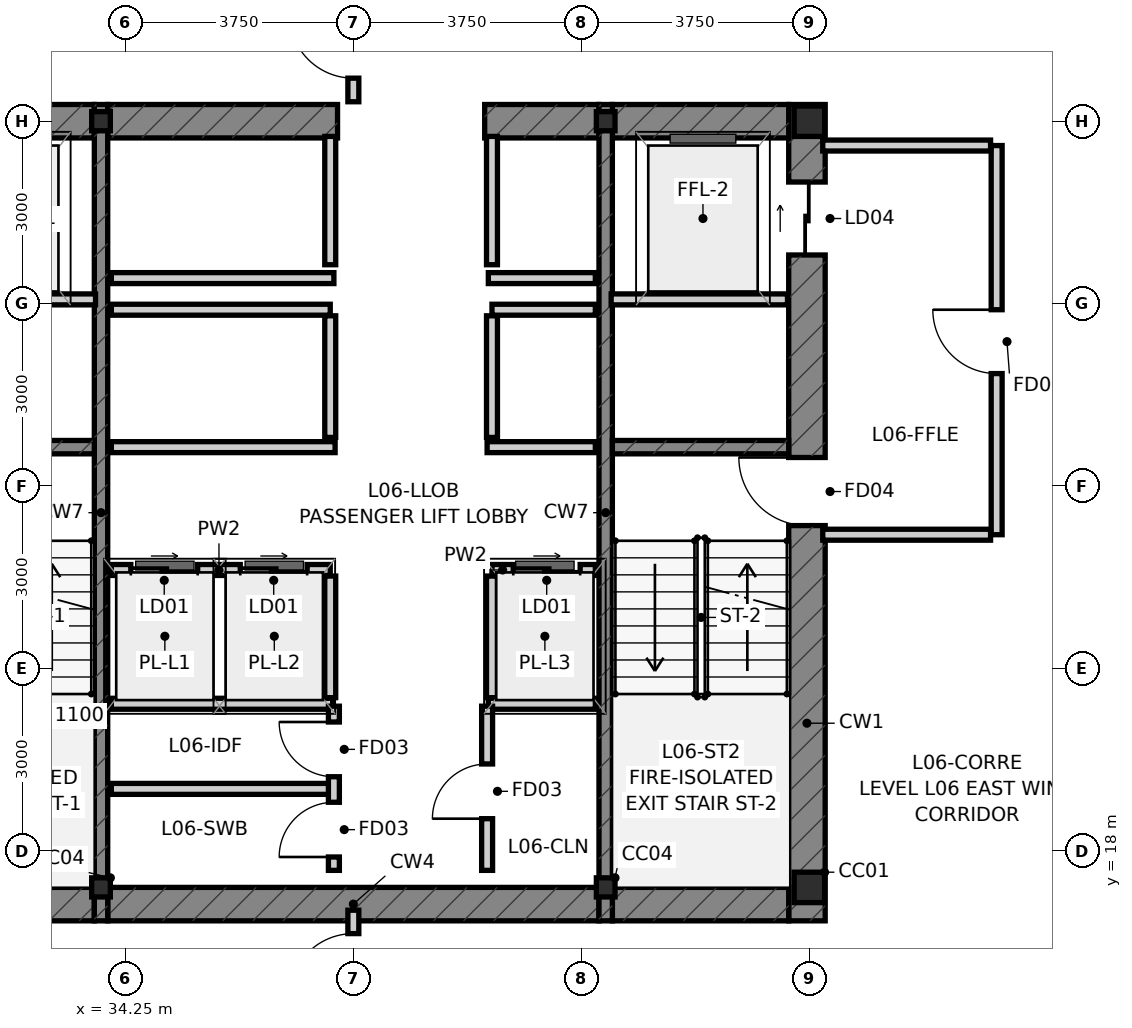
"""IFC4 building model, lengths in metres.
Left out: names, types, materials, properties, quantities, classifications, styles, units other than length and angle.
Written with IfcOpenShell. Run it as: python <this file> out.ifc"""

import sys

from ifc_helpers import new_model, si_unit, direction, frame, frame_2d, origin, origin_2d, place, context, subcontext, project, spatial, rectangle, i_section, extrude, source, transform, mapped, element, fill, save


model = new_model("IFC4")
c1 = context("Model", 3, precision=1e-05, world=origin(), true_north=direction((0.0, 1.0)))
c2 = subcontext(c1, "Body", "Model", "MODEL_VIEW")
j1 = project(units=[si_unit("LENGTHUNIT", "METRE"), si_unit("PLANEANGLEUNIT", "RADIAN")], contexts=[c1])
p1 = place(None, origin())
s1 = spatial("IfcSite", under=j1, at=p1, CompositionType="ELEMENT")
p2 = place(p1, origin())
s2 = spatial("IfcBuilding", under=s1, at=p2, CompositionType="ELEMENT")
p3 = place(p2, frame((0.0, 0.0, 27.6)))
s3 = spatial("IfcBuildingStorey", under=s2, at=p3, CompositionType="ELEMENT", Elevation=27.6)
m1 = source(origin(), c2, "Body", "SweptSolid", [
    extrude(i_section(OverallWidth=0.5, OverallDepth=0.5, WebThickness=0.028, FlangeThickness=0.04, at=origin_2d()), origin(), (0.0, 0.0, 1.0), 3.65),
])
for number, where, z_axis, x_axis in (
    (1, (45.5, 17.4, 0.0), (0.0, 0.0, 1.0), (1.0, 0.0, 0.0)),
    (2, (45.5, 30.0, 0.0), (0.0, 0.0, 1.0), (1.0, 0.0, 0.0)),
):
    element("IfcColumn", number, at=place(p3, frame(where, z_axis=z_axis, x_axis=x_axis)), inside=s3, PredefinedType="COLUMN", context=c2, shape_type="MappedRepresentation", body=[
        mapped(m1, transform((0.0, 0.0, 0.0), scale=1.0)),
    ])
m2 = source(origin(), c2, "Body", "SweptSolid", [
    extrude(i_section(OverallWidth=0.307, OverallDepth=0.315, WebThickness=0.012, FlangeThickness=0.019, at=origin_2d()), origin(), (0.0, 0.0, 1.0), 3.65),
])
for number, where, z_axis, x_axis in (
    (3, (33.85, 17.4, 0.0), (0.0, 0.0, 1.0), (1.0, 0.0, 0.0)),
    (4, (42.15, 17.4, 0.0), (0.0, 0.0, 1.0), (1.0, 0.0, 0.0)),
    (5, (33.85, 30.0, 0.0), (0.0, 0.0, 1.0), (1.0, 0.0, 0.0)),
    (6, (42.15, 30.0, 0.0), (0.0, 0.0, 1.0), (1.0, 0.0, 0.0)),
):
    element("IfcColumn", number, at=place(p3, frame(where, z_axis=z_axis, x_axis=x_axis)), inside=s3, PredefinedType="COLUMN", context=c2, shape_type="MappedRepresentation", body=[
        mapped(m2, transform((0.0, 0.0, 0.0), scale=1.0)),
    ])
p4 = place(p3, frame((45.46, 16.85, 0.0), z_axis=(0.0, 0.0, 1.0), x_axis=(0.0, 1.0, 0.0)))
e7 = element("IfcWall", 7, at=p4, inside=s3, PredefinedType="SHEAR", context=c2, shape_type="SweptSolid", body=[
    extrude(rectangle(XDim=13.425, YDim=0.6, at=frame_2d((6.712, 0.0))), origin(), (0.0, 0.0, 1.0), 3.65),
])
p5 = place(p4, frame((6.5, 0.0, 0.0)))
e8 = element("IfcOpeningElement", 8, at=p5, cuts=e7, PredefinedType="OPENING", context=c2, shape_type="SweptSolid", body=[
    extrude(rectangle(XDim=1.12, YDim=2.15, at=frame_2d((0.56, 1.075))), frame((0.0, 0.312, 0.0), z_axis=(0.0, -1.0, 0.0), x_axis=(1.0, 0.0, 0.0)), (0.0, 0.0, 1.0), 0.624),
])
p6 = place(p4, frame((10.95, 0.0, 0.0)))
e9 = element("IfcOpeningElement", 9, at=p6, cuts=e7, PredefinedType="OPENING", context=c2, shape_type="SweptSolid", body=[
    extrude(rectangle(XDim=1.2, YDim=2.2, at=frame_2d((0.6, 1.1))), frame((0.0, 0.312, 0.0), z_axis=(0.0, -1.0, 0.0), x_axis=(1.0, 0.0, 0.0)), (0.0, 0.0, 1.0), 0.624),
])
p7 = place(p3, frame((30.84, 17.125, 0.0), z_axis=(0.0, 0.0, 1.0), x_axis=(1.0, 0.0, 0.0)))
e10 = element("IfcWall", 10, at=p7, inside=s3, PredefinedType="SHEAR", context=c2, shape_type="SweptSolid", body=[
    extrude(rectangle(XDim=2.9, YDim=0.55, at=frame_2d((1.45, 0.0))), origin(), (0.0, 0.0, 1.0), 3.65),
])
p8 = place(p3, frame((33.96, 17.125, 0.0), z_axis=(0.0, 0.0, 1.0), x_axis=(1.0, 0.0, 0.0)))
e11 = element("IfcWall", 11, at=p8, inside=s3, PredefinedType="SHEAR", context=c2, shape_type="SweptSolid", body=[
    extrude(rectangle(XDim=8.08, YDim=0.55, at=frame_2d((4.04, 0.0))), origin(), (0.0, 0.0, 1.0), 3.65),
])
for number, where, z_axis, x_axis in (
    (12, (42.26, 17.125, 0.0), (0.0, 0.0, 1.0), (1.0, 0.0, 0.0)),
    (13, (30.84, 30.0, 0.0), (0.0, 0.0, 1.0), (1.0, 0.0, 0.0)),
):
    element("IfcWall", number, at=place(p3, frame(where, z_axis=z_axis, x_axis=x_axis)), inside=s3, PredefinedType="SHEAR", context=c2, shape_type="SweptSolid", body=[
        extrude(rectangle(XDim=2.9, YDim=0.55, at=frame_2d((1.45, 0.0))), origin(), (0.0, 0.0, 1.0), 3.65),
    ])
p9 = place(p3, frame((33.96, 30.0, 0.0), z_axis=(0.0, 0.0, 1.0), x_axis=(1.0, 0.0, 0.0)))
e14 = element("IfcWall", 14, at=p9, inside=s3, PredefinedType="SHEAR", context=c2, shape_type="SweptSolid", body=[
    extrude(rectangle(XDim=3.78, YDim=0.55, at=frame_2d((1.89, 0.0))), origin(), (0.0, 0.0, 1.0), 3.65),
])
p10 = place(p3, frame((40.16, 30.0, 0.0), z_axis=(0.0, 0.0, 1.0), x_axis=(1.0, 0.0, 0.0)))
e15 = element("IfcWall", 15, at=p10, inside=s3, PredefinedType="SHEAR", context=c2, shape_type="SweptSolid", body=[
    extrude(rectangle(XDim=1.88, YDim=0.55, at=frame_2d((0.94, 0.0))), origin(), (0.0, 0.0, 1.0), 3.65),
])
p11 = place(p3, frame((42.26, 30.0, 0.0), z_axis=(0.0, 0.0, 1.0), x_axis=(1.0, 0.0, 0.0)))
e16 = element("IfcWall", 16, at=p11, inside=s3, PredefinedType="SHEAR", context=c2, shape_type="SweptSolid", body=[
    extrude(rectangle(XDim=2.9, YDim=0.55, at=frame_2d((1.45, 0.0))), origin(), (0.0, 0.0, 1.0), 3.65),
])
for number, where, z_axis, x_axis in (
    (17, (33.85, 16.85, 0.0), (0.0, 0.0, 1.0), (0.0, 1.0, 0.0)),
    (18, (42.15, 16.85, 0.0), (0.0, 0.0, 1.0), (0.0, 1.0, 0.0)),
):
    element("IfcWall", number, at=place(p3, frame(where, z_axis=z_axis, x_axis=x_axis)), inside=s3, PredefinedType="SHEAR", context=c2, shape_type="SweptSolid", body=[
        extrude(rectangle(XDim=13.425, YDim=0.22, at=frame_2d((6.712, 0.0))), origin(), (0.0, 0.0, 1.0), 3.65),
    ])
for number, where, z_axis, x_axis in (
    (19, (30.84, 24.64, 0.0), (0.0, 0.0, 1.0), (1.0, 0.0, 0.0)),
    (20, (42.26, 24.64, 0.0), (0.0, 0.0, 1.0), (1.0, 0.0, 0.0)),
):
    element("IfcWall", number, at=place(p3, frame(where, z_axis=z_axis, x_axis=x_axis)), inside=s3, PredefinedType="SHEAR", context=c2, shape_type="SweptSolid", body=[
        extrude(rectangle(XDim=2.9, YDim=0.22, at=frame_2d((1.45, 0.0))), origin(), (0.0, 0.0, 1.0), 3.65),
    ])
p12 = place(p3, frame((34.02, 22.62, 0.0), z_axis=(0.0, 0.0, 1.0), x_axis=(1.0, 0.0, 0.0)))
e21 = element("IfcWall", 21, at=p12, inside=s3, PredefinedType="PARTITIONING", context=c2, shape_type="SweptSolid", body=[
    extrude(rectangle(XDim=3.6, YDim=0.18, at=frame_2d((1.8, 0.0))), origin(), (0.0, 0.0, 1.0), 3.4),
])
p13 = place(p12, frame((0.32, 0.0, 0.0)))
e22 = element("IfcOpeningElement", 22, at=p13, cuts=e21, PredefinedType="OPENING", context=c2, shape_type="SweptSolid", body=[
    extrude(rectangle(XDim=1.1, YDim=2.2, at=frame_2d((0.55, 1.1))), frame((0.0, 0.102, 0.0), z_axis=(0.0, -1.0, 0.0), x_axis=(1.0, 0.0, 0.0)), (0.0, 0.0, 1.0), 0.204),
])
p14 = place(p12, frame((2.12, 0.0, 0.0)))
e23 = element("IfcOpeningElement", 23, at=p14, cuts=e21, PredefinedType="OPENING", context=c2, shape_type="SweptSolid", body=[
    extrude(rectangle(XDim=1.1, YDim=2.2, at=frame_2d((0.55, 1.1))), frame((0.0, 0.102, 0.0), z_axis=(0.0, -1.0, 0.0), x_axis=(1.0, 0.0, 0.0)), (0.0, 0.0, 1.0), 0.204),
])
p15 = place(p3, frame((40.28, 22.62, 0.0), z_axis=(0.0, 0.0, 1.0), x_axis=(1.0, 0.0, 0.0)))
e24 = element("IfcWall", 24, at=p15, inside=s3, PredefinedType="PARTITIONING", context=c2, shape_type="SweptSolid", body=[
    extrude(rectangle(XDim=1.7, YDim=0.18, at=frame_2d((0.85, 0.0))), origin(), (0.0, 0.0, 1.0), 3.4),
])
p16 = place(p15, frame((0.35, 0.0, 0.0)))
e25 = element("IfcOpeningElement", 25, at=p16, cuts=e24, PredefinedType="OPENING", context=c2, shape_type="SweptSolid", body=[
    extrude(rectangle(XDim=1.1, YDim=2.2, at=frame_2d((0.55, 1.1))), frame((0.0, 0.102, 0.0), z_axis=(0.0, -1.0, 0.0), x_axis=(1.0, 0.0, 0.0)), (0.0, 0.0, 1.0), 0.204),
])
for number, where, z_axis, x_axis in (
    (26, (37.62, 20.52, 0.0), (0.0, 0.0, 1.0), (0.0, 1.0, 0.0)),
    (27, (40.28, 20.52, 0.0), (0.0, 0.0, 1.0), (0.0, 1.0, 0.0)),
):
    element("IfcWall", number, at=place(p3, frame(where, z_axis=z_axis, x_axis=x_axis)), inside=s3, PredefinedType="PARTITIONING", context=c2, shape_type="SweptSolid", body=[
        extrude(rectangle(XDim=2.0, YDim=0.18, at=frame_2d((1.0, 0.0))), origin(), (0.0, 0.0, 1.0), 3.4),
    ])
p17 = place(p3, frame((34.02, 26.9, 0.0), z_axis=(0.0, 0.0, 1.0), x_axis=(1.0, 0.0, 0.0)))
e28 = element("IfcWall", 28, at=p17, inside=s3, PredefinedType="PARTITIONING", context=c2, shape_type="SweptSolid", body=[
    extrude(rectangle(XDim=3.6, YDim=0.18, at=frame_2d((1.8, 0.0))), origin(), (0.0, 0.0, 1.0), 3.4),
])
p18 = place(p3, frame((40.28, 26.9, 0.0), z_axis=(0.0, 0.0, 1.0), x_axis=(1.0, 0.0, 0.0)))
e29 = element("IfcWall", 29, at=p18, inside=s3, PredefinedType="PARTITIONING", context=c2, shape_type="SweptSolid", body=[
    extrude(rectangle(XDim=1.7, YDim=0.18, at=frame_2d((0.85, 0.0))), origin(), (0.0, 0.0, 1.0), 3.4),
])
for number, where, z_axis, x_axis in (
    (30, (37.62, 24.8, 0.0), (0.0, 0.0, 1.0), (0.0, 1.0, 0.0)),
    (31, (40.28, 24.8, 0.0), (0.0, 0.0, 1.0), (0.0, 1.0, 0.0)),
):
    element("IfcWall", number, at=place(p3, frame(where, z_axis=z_axis, x_axis=x_axis)), inside=s3, PredefinedType="PARTITIONING", context=c2, shape_type="SweptSolid", body=[
        extrude(rectangle(XDim=2.0, YDim=0.18, at=frame_2d((1.0, 0.0))), origin(), (0.0, 0.0, 1.0), 3.4),
    ])
p19 = place(p3, frame((34.02, 24.64, 0.0), z_axis=(0.0, 0.0, 1.0), x_axis=(1.0, 0.0, 0.0)))
e32 = element("IfcWall", 32, at=p19, inside=s3, PredefinedType="PARTITIONING", context=c2, shape_type="SweptSolid", body=[
    extrude(rectangle(XDim=3.68, YDim=0.18, at=frame_2d((1.84, 0.0))), origin(), (0.0, 0.0, 1.0), 3.4),
])
p20 = place(p3, frame((40.2, 24.64, 0.0), z_axis=(0.0, 0.0, 1.0), x_axis=(1.0, 0.0, 0.0)))
e33 = element("IfcWall", 33, at=p20, inside=s3, PredefinedType="PARTITIONING", context=c2, shape_type="SweptSolid", body=[
    extrude(rectangle(XDim=1.78, YDim=0.18, at=frame_2d((0.89, 0.0))), origin(), (0.0, 0.0, 1.0), 3.4),
])
p21 = place(p3, frame((34.02, 27.42, 0.0), z_axis=(0.0, 0.0, 1.0), x_axis=(1.0, 0.0, 0.0)))
e34 = element("IfcWall", 34, at=p21, inside=s3, PredefinedType="PARTITIONING", context=c2, shape_type="SweptSolid", body=[
    extrude(rectangle(XDim=3.66, YDim=0.18, at=frame_2d((1.83, 0.0))), origin(), (0.0, 0.0, 1.0), 3.4),
])
p22 = place(p3, frame((40.22, 27.42, 0.0), z_axis=(0.0, 0.0, 1.0), x_axis=(1.0, 0.0, 0.0)))
e35 = element("IfcWall", 35, at=p22, inside=s3, PredefinedType="PARTITIONING", context=c2, shape_type="SweptSolid", body=[
    extrude(rectangle(XDim=1.76, YDim=0.18, at=frame_2d((0.88, 0.0))), origin(), (0.0, 0.0, 1.0), 3.4),
])
for number, where, z_axis, x_axis in (
    (36, (37.62, 27.64, 0.0), (0.0, 0.0, 1.0), (0.0, 1.0, 0.0)),
    (37, (40.28, 27.64, 0.0), (0.0, 0.0, 1.0), (0.0, 1.0, 0.0)),
):
    element("IfcWall", number, at=place(p3, frame(where, z_axis=z_axis, x_axis=x_axis)), inside=s3, PredefinedType="PARTITIONING", context=c2, shape_type="SweptSolid", body=[
        extrude(rectangle(XDim=2.11, YDim=0.18, at=frame_2d((1.055, 0.0))), origin(), (0.0, 0.0, 1.0), 3.4),
    ])
p23 = place(p3, frame((48.58, 23.2, 0.0), z_axis=(0.0, 0.0, 1.0), x_axis=(0.0, 1.0, 0.0)))
e38 = element("IfcWall", 38, at=p23, inside=s3, PredefinedType="PARTITIONING", context=c2, shape_type="SweptSolid", body=[
    extrude(rectangle(XDim=6.4, YDim=0.18, at=frame_2d((3.2, 0.0))), origin(), (0.0, 0.0, 1.0), 3.4),
])
p24 = place(p23, frame((2.65, 0.0, 0.0)))
e39 = element("IfcOpeningElement", 39, at=p24, cuts=e38, PredefinedType="OPENING", context=c2, shape_type="SweptSolid", body=[
    extrude(rectangle(XDim=1.05, YDim=2.15, at=frame_2d((0.525, 1.075))), frame((0.0, 0.102, 0.0), z_axis=(0.0, -1.0, 0.0), x_axis=(1.0, 0.0, 0.0)), (0.0, 0.0, 1.0), 0.204),
])
p25 = place(p3, frame((45.72, 23.2, 0.0), z_axis=(0.0, 0.0, 1.0), x_axis=(1.0, 0.0, 0.0)))
e40 = element("IfcWall", 40, at=p25, inside=s3, PredefinedType="PARTITIONING", context=c2, shape_type="SweptSolid", body=[
    extrude(rectangle(XDim=2.76, YDim=0.18, at=frame_2d((1.38, 0.0))), origin(), (0.0, 0.0, 1.0), 3.4),
])
p26 = place(p3, frame((45.72, 29.6, 0.0), z_axis=(0.0, 0.0, 1.0), x_axis=(1.0, 0.0, 0.0)))
e41 = element("IfcWall", 41, at=p26, inside=s3, PredefinedType="PARTITIONING", context=c2, shape_type="SweptSolid", body=[
    extrude(rectangle(XDim=2.76, YDim=0.18, at=frame_2d((1.38, 0.0))), origin(), (0.0, 0.0, 1.0), 2.783),
])
for number, where, z_axis, x_axis in (
    (42, (30.86, 27.07, 0.0), (0.0, 0.0, 1.0), (1.0, 0.0, 0.0)),
    (43, (42.24, 27.07, 0.0), (0.0, 0.0, 1.0), (1.0, 0.0, 0.0)),
):
    element("IfcWall", number, at=place(p3, frame(where, z_axis=z_axis, x_axis=x_axis)), inside=s3, PredefinedType="PARTITIONING", context=c2, shape_type="SweptSolid", body=[
        extrude(rectangle(XDim=2.9, YDim=0.18, at=frame_2d((1.45, 0.0))), origin(), (0.0, 0.0, 1.0), 3.4),
    ])
p27 = place(p3, frame((34.02, 20.42, 0.0), z_axis=(0.0, 0.0, 1.0), x_axis=(1.0, 0.0, 0.0)))
e44 = element("IfcWall", 44, at=p27, inside=s3, PredefinedType="PARTITIONING", context=c2, shape_type="SweptSolid", body=[
    extrude(rectangle(XDim=3.64, YDim=0.18, at=frame_2d((1.82, 0.0))), origin(), (0.0, 0.0, 1.0), 3.4),
])
p28 = place(p3, frame((40.22, 20.42, 0.0), z_axis=(0.0, 0.0, 1.0), x_axis=(1.0, 0.0, 0.0)))
e45 = element("IfcWall", 45, at=p28, inside=s3, PredefinedType="PARTITIONING", context=c2, shape_type="SweptSolid", body=[
    extrude(rectangle(XDim=1.76, YDim=0.18, at=frame_2d((0.88, 0.0))), origin(), (0.0, 0.0, 1.0), 3.4),
])
p29 = place(p3, frame((34.02, 19.02, 0.0), z_axis=(0.0, 0.0, 1.0), x_axis=(1.0, 0.0, 0.0)))
e46 = element("IfcWall", 46, at=p29, inside=s3, PredefinedType="PARTITIONING", context=c2, shape_type="SweptSolid", body=[
    extrude(rectangle(XDim=3.58, YDim=0.18, at=frame_2d((1.79, 0.0))), origin(), (0.0, 0.0, 1.0), 3.4),
])
p30 = place(p3, frame((37.68, 17.68, 0.0), z_axis=(0.0, 0.0, 1.0), x_axis=(0.0, 1.0, 0.0)))
e47 = element("IfcWall", 47, at=p30, inside=s3, PredefinedType="PARTITIONING", context=c2, shape_type="SweptSolid", body=[
    extrude(rectangle(XDim=2.7, YDim=0.18, at=frame_2d((1.35, 0.0))), origin(), (0.0, 0.0, 1.0), 3.4),
])
p31 = place(p30, frame((0.22, 0.0, 0.0)))
e48 = element("IfcOpeningElement", 48, at=p31, cuts=e47, PredefinedType="OPENING", context=c2, shape_type="SweptSolid", body=[
    extrude(rectangle(XDim=0.9, YDim=2.1, at=frame_2d((0.45, 1.05))), frame((0.0, 0.102, 0.0), z_axis=(0.0, -1.0, 0.0), x_axis=(1.0, 0.0, 0.0)), (0.0, 0.0, 1.0), 0.204),
])
p32 = place(p30, frame((1.54, 0.0, 0.0)))
e49 = element("IfcOpeningElement", 49, at=p32, cuts=e47, PredefinedType="OPENING", context=c2, shape_type="SweptSolid", body=[
    extrude(rectangle(XDim=0.9, YDim=2.1, at=frame_2d((0.45, 1.05))), frame((0.0, 0.102, 0.0), z_axis=(0.0, -1.0, 0.0), x_axis=(1.0, 0.0, 0.0)), (0.0, 0.0, 1.0), 0.204),
])
p33 = place(p3, frame((40.2, 17.68, 0.0), z_axis=(0.0, 0.0, 1.0), x_axis=(0.0, 1.0, 0.0)))
e50 = element("IfcWall", 50, at=p33, inside=s3, PredefinedType="PARTITIONING", context=c2, shape_type="SweptSolid", body=[
    extrude(rectangle(XDim=2.7, YDim=0.18, at=frame_2d((1.35, 0.0))), origin(), (0.0, 0.0, 1.0), 3.4),
])
p34 = place(p33, frame((0.85, 0.0, 0.0)))
e51 = element("IfcOpeningElement", 51, at=p34, cuts=e50, PredefinedType="OPENING", context=c2, shape_type="SweptSolid", body=[
    extrude(rectangle(XDim=0.9, YDim=2.1, at=frame_2d((0.45, 1.05))), frame((0.0, 0.102, 0.0), z_axis=(0.0, -1.0, 0.0), x_axis=(1.0, 0.0, 0.0)), (0.0, 0.0, 1.0), 0.204),
])
p35 = place(p3, frame((38.0, 15.205, 0.0), z_axis=(0.0, 0.0, 1.0), x_axis=(0.0, 1.0, 0.0)))
e52 = element("IfcWall", 52, at=p35, inside=s3, PredefinedType="PARTITIONING", context=c2, shape_type="SweptSolid", body=[
    extrude(rectangle(XDim=1.82, YDim=0.18, at=frame_2d((0.91, 0.0))), origin(), (0.0, 0.0, 1.0), 3.4),
])
p36 = place(p35, frame((0.385, 0.0, 0.0)))
e53 = element("IfcOpeningElement", 53, at=p36, cuts=e52, PredefinedType="OPENING", context=c2, shape_type="SweptSolid", body=[
    extrude(rectangle(XDim=1.05, YDim=2.15, at=frame_2d((0.525, 1.075))), frame((0.0, 0.102, 0.0), z_axis=(0.0, -1.0, 0.0), x_axis=(1.0, 0.0, 0.0)), (0.0, 0.0, 1.0), 0.204),
])
p37 = place(p3, frame((38.0, 30.32, 0.0), z_axis=(0.0, 0.0, 1.0), x_axis=(0.0, 1.0, 0.0)))
e54 = element("IfcWall", 54, at=p37, inside=s3, PredefinedType="PARTITIONING", context=c2, shape_type="SweptSolid", body=[
    extrude(rectangle(XDim=1.825, YDim=0.18, at=frame_2d((0.913, 0.0))), origin(), (0.0, 0.0, 1.0), 3.4),
])
p38 = place(p37, frame((0.388, 0.0, 0.0)))
e55 = element("IfcOpeningElement", 55, at=p38, cuts=e54, PredefinedType="OPENING", context=c2, shape_type="SweptSolid", body=[
    extrude(rectangle(XDim=1.05, YDim=2.15, at=frame_2d((0.525, 1.075))), frame((0.0, 0.102, 0.0), z_axis=(0.0, -1.0, 0.0), x_axis=(1.0, 0.0, 0.0)), (0.0, 0.0, 1.0), 0.204),
])
p39 = place(p5, origin())
e56 = element("IfcDoor", 56, at=p39, inside=s3, OperationType="SINGLE_SWING_RIGHT", PredefinedType="DOOR", context=c2, shape_type="SweptSolid", body=[
    extrude(rectangle(XDim=1.12, YDim=2.15, at=frame_2d((0.56, 1.075))), frame((0.0, 0.025, 0.0), z_axis=(0.0, -1.0, 0.0), x_axis=(1.0, 0.0, 0.0)), (0.0, 0.0, 1.0), 0.05),
])
fill(e8, e56)
p40 = place(p6, origin())
e57 = element("IfcDoor", 57, at=p40, inside=s3, OperationType="SLIDING_TO_RIGHT", PredefinedType="DOOR", context=c2, shape_type="SweptSolid", body=[
    extrude(rectangle(XDim=1.2, YDim=2.2, at=frame_2d((0.6, 1.1))), frame((0.0, 0.025, 0.0), z_axis=(0.0, -1.0, 0.0), x_axis=(1.0, 0.0, 0.0)), (0.0, 0.0, 1.0), 0.05),
])
fill(e9, e57)
p41 = place(p13, origin())
e58 = element("IfcDoor", 58, at=p41, inside=s3, OperationType="SLIDING_TO_LEFT", PredefinedType="DOOR", context=c2, shape_type="SweptSolid", body=[
    extrude(rectangle(XDim=1.1, YDim=2.2, at=frame_2d((0.55, 1.1))), frame((0.0, 0.025, 0.0), z_axis=(0.0, -1.0, 0.0), x_axis=(1.0, 0.0, 0.0)), (0.0, 0.0, 1.0), 0.05),
])
fill(e22, e58)
p42 = place(p14, origin())
e59 = element("IfcDoor", 59, at=p42, inside=s3, OperationType="SLIDING_TO_RIGHT", PredefinedType="DOOR", context=c2, shape_type="SweptSolid", body=[
    extrude(rectangle(XDim=1.1, YDim=2.2, at=frame_2d((0.55, 1.1))), frame((0.0, 0.025, 0.0), z_axis=(0.0, -1.0, 0.0), x_axis=(1.0, 0.0, 0.0)), (0.0, 0.0, 1.0), 0.05),
])
fill(e23, e59)
p43 = place(p16, origin())
e60 = element("IfcDoor", 60, at=p43, inside=s3, OperationType="SLIDING_TO_LEFT", PredefinedType="DOOR", context=c2, shape_type="SweptSolid", body=[
    extrude(rectangle(XDim=1.1, YDim=2.2, at=frame_2d((0.55, 1.1))), frame((0.0, 0.025, 0.0), z_axis=(0.0, -1.0, 0.0), x_axis=(1.0, 0.0, 0.0)), (0.0, 0.0, 1.0), 0.05),
])
fill(e25, e60)
p44 = place(p24, origin())
e61 = element("IfcDoor", 61, at=p44, inside=s3, OperationType="SINGLE_SWING_RIGHT", PredefinedType="DOOR", context=c2, shape_type="SweptSolid", body=[
    extrude(rectangle(XDim=1.05, YDim=2.15, at=frame_2d((0.525, 1.075))), frame((0.0, 0.025, 0.0), z_axis=(0.0, -1.0, 0.0), x_axis=(1.0, 0.0, 0.0)), (0.0, 0.0, 1.0), 0.05),
])
fill(e39, e61)
p45 = place(p31, origin())
e62 = element("IfcDoor", 62, at=p45, inside=s3, OperationType="SINGLE_SWING_LEFT", PredefinedType="DOOR", context=c2, shape_type="SweptSolid", body=[
    extrude(rectangle(XDim=0.9, YDim=2.1, at=frame_2d((0.45, 1.05))), frame((0.0, 0.025, 0.0), z_axis=(0.0, -1.0, 0.0), x_axis=(1.0, 0.0, 0.0)), (0.0, 0.0, 1.0), 0.05),
])
fill(e48, e62)
p46 = place(p32, origin())
e63 = element("IfcDoor", 63, at=p46, inside=s3, OperationType="SINGLE_SWING_RIGHT", PredefinedType="DOOR", context=c2, shape_type="SweptSolid", body=[
    extrude(rectangle(XDim=0.9, YDim=2.1, at=frame_2d((0.45, 1.05))), frame((0.0, 0.025, 0.0), z_axis=(0.0, -1.0, 0.0), x_axis=(1.0, 0.0, 0.0)), (0.0, 0.0, 1.0), 0.05),
])
fill(e49, e63)
p47 = place(p34, origin())
e64 = element("IfcDoor", 64, at=p47, inside=s3, OperationType="SINGLE_SWING_LEFT", PredefinedType="DOOR", context=c2, shape_type="SweptSolid", body=[
    extrude(rectangle(XDim=0.9, YDim=2.1, at=frame_2d((0.45, 1.05))), frame((0.0, 0.025, 0.0), z_axis=(0.0, -1.0, 0.0), x_axis=(1.0, 0.0, 0.0)), (0.0, 0.0, 1.0), 0.05),
])
fill(e51, e64)
p48 = place(p36, origin())
e65 = element("IfcDoor", 65, at=p48, inside=s3, OperationType="SINGLE_SWING_LEFT", PredefinedType="DOOR", context=c2, shape_type="SweptSolid", body=[
    extrude(rectangle(XDim=1.05, YDim=2.15, at=frame_2d((0.525, 1.075))), frame((0.0, 0.025, 0.0), z_axis=(0.0, -1.0, 0.0), x_axis=(1.0, 0.0, 0.0)), (0.0, 0.0, 1.0), 0.05),
])
fill(e53, e65)
p49 = place(p38, origin())
e66 = element("IfcDoor", 66, at=p49, inside=s3, OperationType="SINGLE_SWING_RIGHT", PredefinedType="DOOR", context=c2, shape_type="SweptSolid", body=[
    extrude(rectangle(XDim=1.05, YDim=2.15, at=frame_2d((0.525, 1.075))), frame((0.0, 0.025, 0.0), z_axis=(0.0, -1.0, 0.0), x_axis=(1.0, 0.0, 0.0)), (0.0, 0.0, 1.0), 0.05),
])
fill(e55, e66)
save(model, sys.argv[1])
